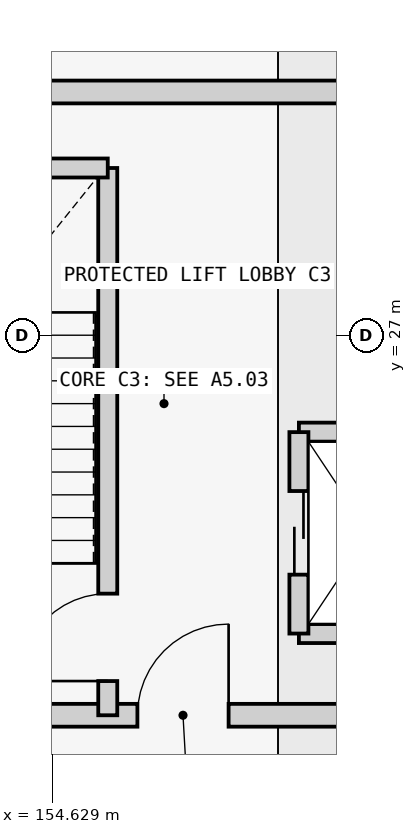
"""IFC4 building model, lengths in metres.
Left out: names, types, materials, properties, quantities, classifications, styles, units other than length and angle.
Written with IfcOpenShell. Run it as: python <this file> out.ifc"""

import sys

from ifc_helpers import new_model, si_unit, direction, frame, frame_2d, origin, place, context, subcontext, project, spatial, rectangle, extrude, element, fill, save


model = new_model("IFC4")
c1 = context("Model", 3, precision=1e-05, world=origin(), true_north=direction((0.0, 1.0)))
c2 = subcontext(c1, "Body", "Model", "MODEL_VIEW")
j1 = project(units=[si_unit("LENGTHUNIT", "METRE"), si_unit("PLANEANGLEUNIT", "RADIAN")], contexts=[c1])
p1 = place(None, origin())
s1 = spatial("IfcSite", under=j1, at=p1, CompositionType="ELEMENT")
p2 = place(p1, origin())
s2 = spatial("IfcBuilding", under=s1, at=p2, CompositionType="ELEMENT")
p3 = place(p2, frame((0.0, 0.0, 21.0)))
s3 = spatial("IfcBuildingStorey", under=s2, at=p3, CompositionType="ELEMENT", Elevation=21.0)
p4 = place(p3, frame((151.0, 22.0, 0.0), z_axis=(0.0, 0.0, 1.0), x_axis=(1.0, 0.0, 0.0)))
e1 = element("IfcWall", 1, at=p4, inside=s3, PredefinedType="SHEAR", context=c2, shape_type="SweptSolid", body=[
    extrude(rectangle(XDim=10.2, YDim=0.3, at=frame_2d((5.1, 0.0))), origin(), (0.0, 0.0, 1.0), 3.96),
])
p5 = place(p4, frame((4.75, 0.0, 0.0)))
e2 = element("IfcOpeningElement", 2, at=p5, cuts=e1, PredefinedType="OPENING", context=c2, shape_type="SweptSolid", body=[
    extrude(rectangle(XDim=1.2, YDim=2.15, at=frame_2d((0.6, 1.075))), frame((0.0, 0.16, 0.0), z_axis=(0.0, -1.0, 0.0), x_axis=(1.0, 0.0, 0.0)), (0.0, 0.0, 1.0), 0.32),
])
p6 = place(p3, frame((161.2, 30.2, 0.0), z_axis=(0.0, 0.0, 1.0), x_axis=(-1.0, 0.0, 0.0)))
e3 = element("IfcWall", 3, at=p6, inside=s3, PredefinedType="SHEAR", context=c2, shape_type="SweptSolid", body=[
    extrude(rectangle(XDim=10.2, YDim=0.3, at=frame_2d((5.1, 0.0))), origin(), (0.0, 0.0, 1.0), 3.96),
])
p7 = place(p3, frame((155.36, 22.0, 0.0), z_axis=(0.0, 0.0, 1.0), x_axis=(0.0, 1.0, 0.0)))
e4 = element("IfcWall", 4, at=p7, inside=s3, PredefinedType="SHEAR", context=c2, shape_type="SweptSolid", body=[
    extrude(rectangle(XDim=7.2, YDim=0.25, at=frame_2d((3.6, 0.0))), origin(), (0.0, 0.0, 1.0), 3.96),
])
p8 = place(p7, frame((0.45, 0.0, 0.0)))
e5 = element("IfcOpeningElement", 5, at=p8, cuts=e4, PredefinedType="OPENING", context=c2, shape_type="SweptSolid", body=[
    extrude(rectangle(XDim=1.15, YDim=2.15, at=frame_2d((0.575, 1.075))), frame((0.0, 0.135, 0.0), z_axis=(0.0, -1.0, 0.0), x_axis=(1.0, 0.0, 0.0)), (0.0, 0.0, 1.0), 0.27),
])
p9 = place(p3, frame((151.0, 29.2, 0.0), z_axis=(0.0, 0.0, 1.0), x_axis=(1.0, 0.0, 0.0)))
e6 = element("IfcWall", 6, at=p9, inside=s3, PredefinedType="SHEAR", context=c2, shape_type="SweptSolid", body=[
    extrude(rectangle(XDim=4.36, YDim=0.25, at=frame_2d((2.18, 0.0))), origin(), (0.0, 0.0, 1.0), 3.96),
])
for number, where, z_axis, x_axis in (
    (7, (157.875, 23.075, 0.0), (0.0, 0.0, 1.0), (1.0, 0.0, 0.0)),
    (8, (157.875, 25.725, 0.0), (0.0, 0.0, 1.0), (1.0, 0.0, 0.0)),
):
    element("IfcWall", number, at=place(p3, frame(where, z_axis=z_axis, x_axis=x_axis)), inside=s3, PredefinedType="SHEAR", context=c2, shape_type="SweptSolid", body=[
        extrude(rectangle(XDim=1.85, YDim=0.25, at=frame_2d((0.925, 0.0))), origin(), (0.0, 0.0, 1.0), 3.96),
    ])
p10 = place(p3, frame((157.875, 23.075, 0.0), z_axis=(0.0, 0.0, 1.0), x_axis=(0.0, 1.0, 0.0)))
e9 = element("IfcWall", 9, at=p10, inside=s3, PredefinedType="SHEAR", context=c2, shape_type="SweptSolid", body=[
    extrude(rectangle(XDim=2.65, YDim=0.25, at=frame_2d((1.325, 0.0))), origin(), (0.0, 0.0, 1.0), 3.96),
])
p11 = place(p10, frame((0.775, 0.0, 0.0)))
e10 = element("IfcOpeningElement", 10, at=p11, cuts=e9, PredefinedType="OPENING", context=c2, shape_type="SweptSolid", body=[
    extrude(rectangle(XDim=1.1, YDim=2.15, at=frame_2d((0.55, 1.075))), frame((0.0, 0.135, 0.0), z_axis=(0.0, -1.0, 0.0), x_axis=(1.0, 0.0, 0.0)), (0.0, 0.0, 1.0), 0.27),
])
p12 = place(p8, origin())
e11 = element("IfcDoor", 11, at=p12, inside=s3, OperationType="SINGLE_SWING_LEFT", PredefinedType="DOOR", context=c2, shape_type="SweptSolid", body=[
    extrude(rectangle(XDim=1.15, YDim=2.15, at=frame_2d((0.575, 1.075))), frame((0.0, 0.025, 0.0), z_axis=(0.0, -1.0, 0.0), x_axis=(1.0, 0.0, 0.0)), (0.0, 0.0, 1.0), 0.05),
])
fill(e5, e11)
p13 = place(p5, origin())
e12 = element("IfcDoor", 12, at=p13, inside=s3, OperationType="SINGLE_SWING_RIGHT", PredefinedType="DOOR", context=c2, shape_type="SweptSolid", body=[
    extrude(rectangle(XDim=1.2, YDim=2.15, at=frame_2d((0.6, 1.075))), frame((0.0, 0.025, 0.0), z_axis=(0.0, -1.0, 0.0), x_axis=(1.0, 0.0, 0.0)), (0.0, 0.0, 1.0), 0.05),
])
fill(e2, e12)
p14 = place(p11, origin())
e13 = element("IfcDoor", 13, at=p14, inside=s3, OperationType="DOUBLE_DOOR_SLIDING", PredefinedType="USERDEFINED", context=c2, shape_type="SweptSolid", body=[
    extrude(rectangle(XDim=1.1, YDim=2.15, at=frame_2d((0.55, 1.075))), frame((0.0, 0.025, 0.0), z_axis=(0.0, -1.0, 0.0), x_axis=(1.0, 0.0, 0.0)), (0.0, 0.0, 1.0), 0.05),
])
fill(e10, e13)
save(model, sys.argv[1])
